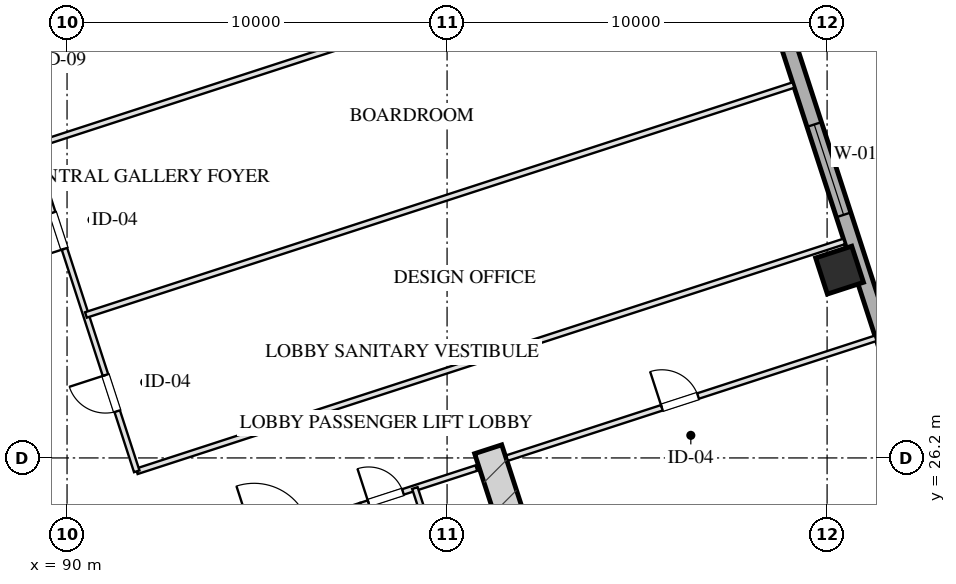
"""IFC4 building model, lengths in metres.
Left out: names, types, materials, properties, quantities, classifications, styles, units other than length and angle.
Written with IfcOpenShell. Run it as: python <this file> out.ifc"""

import sys

from ifc_helpers import new_model, si_unit, direction, frame, frame_2d, origin, origin_2d, place, context, subcontext, project, spatial, rectangle, hollow_rectangle, extrude, element, fill, save


model = new_model("IFC4")
c1 = context("Model", 3, precision=1e-05, world=origin(), true_north=direction((0.0, 1.0)))
c2 = subcontext(c1, "Body", "Model", "MODEL_VIEW")
j1 = project(units=[si_unit("LENGTHUNIT", "METRE"), si_unit("PLANEANGLEUNIT", "RADIAN")], contexts=[c1])
p1 = place(None, origin())
s1 = spatial("IfcSite", under=j1, at=p1, CompositionType="ELEMENT")
p2 = place(p1, origin())
s2 = spatial("IfcBuilding", under=s1, at=p2, CompositionType="ELEMENT")
p3 = place(p2, frame((0.0, 0.0, 34.0)))
s3 = spatial("IfcBuildingStorey", under=s2, at=p3, CompositionType="ELEMENT", Elevation=34.0)
p4 = place(p3, frame((101.082, 26.429, 0.0), z_axis=(0.0, 0.0, 1.0), x_axis=(0.309016134813, -0.951056795583, 0.0)))
e1 = element("IfcWall", 1, at=p4, inside=s3, PredefinedType="SHEAR", context=c2, shape_type="SweptSolid", body=[
    extrude(rectangle(XDim=9.63, YDim=0.75, at=frame_2d((4.815, 0.0))), origin(), (0.0, 0.0, 1.0), 4.0),
])
p5 = place(p3, frame((110.328, 31.142, 0.0), z_axis=(0.0, 0.0, 1.0), x_axis=(0.951056516295, 0.309016994375, 0.0)))
e2 = element("IfcColumn", 2, at=p5, inside=s3, PredefinedType="COLUMN", context=c2, shape_type="SweptSolid", body=[
    extrude(hollow_rectangle(XDim=1.0, YDim=1.0, WallThickness=0.036, at=origin_2d()), origin(), (0.0, 0.0, 1.0), 4.001),
])
p6 = place(p3, frame((100.345, 63.648, 0.0), z_axis=(0.0, 0.0, 1.0), x_axis=(0.309014526607, -0.951057318118, 0.0)))
e3 = element("IfcWall", 3, at=p6, inside=s3, PredefinedType="SOLIDWALL", context=c2, shape_type="SweptSolid", body=[
    extrude(rectangle(XDim=50.0, YDim=0.4, at=frame_2d((25.0, 0.0))), origin(), (0.0, 0.0, 1.0), 3.16),
])
p7 = place(p6, frame((30.15, 0.0, 0.75)))
e4 = element("IfcOpeningElement", 4, at=p7, cuts=e3, PredefinedType="OPENING", context=c2, shape_type="SweptSolid", body=[
    extrude(rectangle(XDim=2.5, YDim=1.75, at=frame_2d((1.25, 0.875))), frame((0.0, 0.21, 0.0), z_axis=(0.0, -1.0, 0.0), x_axis=(1.0, 0.0, 0.0)), (0.0, 0.0, 1.0), 0.42),
])
p8 = place(p6, frame((21.354, 0.0, 0.0)))
e5 = element("IfcOpeningElement", 5, at=p8, cuts=e3, PredefinedType="OPENING", context=c2, shape_type="SweptSolid", body=[
    extrude(rectangle(XDim=1.1, YDim=2.15, at=frame_2d((0.55, 1.075))), frame((0.0, 0.21, 0.0), z_axis=(0.0, -1.0, 0.0), x_axis=(1.0, 0.0, 0.0)), (0.0, 0.0, 1.0), 0.42),
])
p9 = place(p3, frame((97.727, 24.944, 0.0), z_axis=(0.0, 0.0, 1.0), x_axis=(0.309016001439, -0.951056838919, 0.0)))
e6 = element("IfcWall", 6, at=p9, inside=s3, PredefinedType="PARTITIONING", context=c2, shape_type="SweptSolid", body=[
    extrude(rectangle(XDim=8.43, YDim=0.2, at=frame_2d((4.215, 0.0))), origin(), (0.0, 0.0, 1.0), 3.725),
])
p10 = place(p3, frame((93.542, 23.585, 0.0), z_axis=(0.0, 0.0, 1.0), x_axis=(0.951063829732, 0.308994485023, 0.0)))
e7 = element("IfcWall", 7, at=p10, inside=s3, PredefinedType="PARTITIONING", context=c2, shape_type="SweptSolid", body=[
    extrude(rectangle(XDim=4.4, YDim=0.15, at=frame_2d((2.2, 0.0))), origin(), (0.0, 0.0, 1.0), 3.725),
])
p11 = place(p10, frame((1.45, 0.0, 0.0)))
e8 = element("IfcOpeningElement", 8, at=p11, cuts=e7, PredefinedType="OPENING", context=c2, shape_type="SweptSolid", body=[
    extrude(rectangle(XDim=1.5, YDim=2.05, at=frame_2d((0.75, 1.025))), frame((0.0, 0.085, 0.0), z_axis=(0.0, -1.0, 0.0), x_axis=(1.0, 0.0, 0.0)), (0.0, 0.0, 1.0), 0.17),
])
p12 = place(p3, frame((97.727, 24.944, 0.0), z_axis=(0.0, 0.0, 1.0), x_axis=(0.951036872128, 0.309077446369, 0.0)))
e9 = element("IfcWall", 9, at=p12, inside=s3, PredefinedType="PARTITIONING", context=c2, shape_type="SweptSolid", body=[
    extrude(rectangle(XDim=3.2, YDim=0.15, at=frame_2d((1.6, 0.0))), origin(), (0.0, 0.0, 1.0), 3.725),
])
p13 = place(p12, frame((0.22, 0.0, 0.0)))
e10 = element("IfcOpeningElement", 10, at=p13, cuts=e9, PredefinedType="OPENING", context=c2, shape_type="SweptSolid", body=[
    extrude(rectangle(XDim=0.95, YDim=2.05, at=frame_2d((0.475, 1.025))), frame((0.0, 0.085, 0.0), z_axis=(0.0, -1.0, 0.0), x_axis=(1.0, 0.0, 0.0)), (0.0, 0.0, 1.0), 0.17),
])
p14 = place(p3, frame((99.153, 25.408, 0.0), z_axis=(0.0, 0.0, 1.0), x_axis=(0.309016001439, -0.951056838919, 0.0)))
e11 = element("IfcWall", 11, at=p14, inside=s3, PredefinedType="PARTITIONING", context=c2, shape_type="SweptSolid", body=[
    extrude(rectangle(XDim=8.43, YDim=0.15, at=frame_2d((4.215, 0.0))), origin(), (0.0, 0.0, 1.0), 3.725),
])
p15 = place(p14, frame((2.55, 0.0, 0.0)))
e12 = element("IfcOpeningElement", 12, at=p15, cuts=e11, PredefinedType="OPENING", context=c2, shape_type="SweptSolid", body=[
    extrude(rectangle(XDim=0.95, YDim=2.05, at=frame_2d((0.475, 1.025))), frame((0.0, 0.085, 0.0), z_axis=(0.0, -1.0, 0.0), x_axis=(1.0, 0.0, 0.0)), (0.0, 0.0, 1.0), 0.17),
])
p16 = place(p14, frame((4.7, 0.0, 0.0)))
e13 = element("IfcOpeningElement", 13, at=p16, cuts=e11, PredefinedType="OPENING", context=c2, shape_type="SweptSolid", body=[
    extrude(rectangle(XDim=0.9, YDim=2.05, at=frame_2d((0.45, 1.025))), frame((0.0, 0.085, 0.0), z_axis=(0.0, -1.0, 0.0), x_axis=(1.0, 0.0, 0.0)), (0.0, 0.0, 1.0), 0.17),
])
p17 = place(p14, frame((6.8, 0.0, 0.0)))
e14 = element("IfcOpeningElement", 14, at=p17, cuts=e11, PredefinedType="OPENING", context=c2, shape_type="SweptSolid", body=[
    extrude(rectangle(XDim=0.9, YDim=2.05, at=frame_2d((0.45, 1.025))), frame((0.0, 0.085, 0.0), z_axis=(0.0, -1.0, 0.0), x_axis=(1.0, 0.0, 0.0)), (0.0, 0.0, 1.0), 0.17),
])
p18 = place(p3, frame((101.578, 26.196, 0.0), z_axis=(0.0, 0.0, 1.0), x_axis=(0.951059043131, 0.309009217467, 0.0)))
e15 = element("IfcWall", 15, at=p18, inside=s3, PredefinedType="PARTITIONING", context=c2, shape_type="SweptSolid", body=[
    extrude(rectangle(XDim=10.2, YDim=0.15, at=frame_2d((5.1, 0.0))), origin(), (0.0, 0.0, 1.0), 3.725),
])
p19 = place(p18, frame((4.284, 0.0, 0.0)))
e16 = element("IfcOpeningElement", 16, at=p19, cuts=e15, PredefinedType="OPENING", context=c2, shape_type="SweptSolid", body=[
    extrude(rectangle(XDim=1.0, YDim=2.05, at=frame_2d((0.5, 1.025))), frame((0.0, 0.085, 0.0), z_axis=(0.0, -1.0, 0.0), x_axis=(1.0, 0.0, 0.0)), (0.0, 0.0, 1.0), 0.17),
])
p20 = place(p3, frame((91.834, 25.848, 0.0), z_axis=(0.0, 0.0, 1.0), x_axis=(0.951055605195, 0.309019798438, 0.0)))
e17 = element("IfcWall", 17, at=p20, inside=s3, PredefinedType="PARTITIONING", context=c2, shape_type="SweptSolid", body=[
    extrude(rectangle(XDim=19.575, YDim=0.15, at=frame_2d((9.788, 0.0))), origin(), (0.0, 0.0, 1.0), 3.725),
])
p21 = place(p3, frame((91.834, 25.848, 0.0), z_axis=(0.0, 0.0, 1.0), x_axis=(-0.30901773025, 0.951056277195, 0.0)))
e18 = element("IfcWall", 18, at=p21, inside=s3, PredefinedType="PARTITIONING", context=c2, shape_type="SweptSolid", body=[
    extrude(rectangle(XDim=16.64, YDim=0.15, at=frame_2d((8.32, 0.0))), origin(), (0.0, 0.0, 1.0), 3.725),
])
p22 = place(p21, frame((1.663, 0.0, 0.0)))
e19 = element("IfcOpeningElement", 19, at=p22, cuts=e18, PredefinedType="OPENING", context=c2, shape_type="SweptSolid", body=[
    extrude(rectangle(XDim=1.0, YDim=2.05, at=frame_2d((0.5, 1.025))), frame((0.0, 0.085, 0.0), z_axis=(0.0, -1.0, 0.0), x_axis=(1.0, 0.0, 0.0)), (0.0, 0.0, 1.0), 0.17),
])
p23 = place(p21, frame((6.156, 0.0, 0.0)))
e20 = element("IfcOpeningElement", 20, at=p23, cuts=e18, PredefinedType="OPENING", context=c2, shape_type="SweptSolid", body=[
    extrude(rectangle(XDim=1.0, YDim=2.05, at=frame_2d((0.5, 1.025))), frame((0.0, 0.085, 0.0), z_axis=(0.0, -1.0, 0.0), x_axis=(1.0, 0.0, 0.0)), (0.0, 0.0, 1.0), 0.17),
])
p24 = place(p21, frame((10.649, 0.0, 0.0)))
e21 = element("IfcOpeningElement", 21, at=p24, cuts=e18, PredefinedType="OPENING", context=c2, shape_type="SweptSolid", body=[
    extrude(rectangle(XDim=0.85, YDim=2.05, at=frame_2d((0.425, 1.025))), frame((0.0, 0.085, 0.0), z_axis=(0.0, -1.0, 0.0), x_axis=(1.0, 0.0, 0.0)), (0.0, 0.0, 1.0), 0.17),
])
p25 = place(p21, frame((14.476, 0.0, 0.0)))
e22 = element("IfcOpeningElement", 22, at=p25, cuts=e18, PredefinedType="OPENING", context=c2, shape_type="SweptSolid", body=[
    extrude(rectangle(XDim=1.0, YDim=2.05, at=frame_2d((0.5, 1.025))), frame((0.0, 0.085, 0.0), z_axis=(0.0, -1.0, 0.0), x_axis=(1.0, 0.0, 0.0)), (0.0, 0.0, 1.0), 0.17),
])
for number, where, z_axis, x_axis in (
    (23, (90.497, 29.962, 0.0), (0.0, 0.0, 1.0), (0.951, 0.309, 0.0)),
    (24, (89.057, 34.394, 0.0), (0.0, 0.0, 1.0), (0.951, 0.309, 0.0)),
):
    element("IfcWall", number, at=place(p3, frame(where, z_axis=z_axis, x_axis=x_axis)), inside=s3, PredefinedType="PARTITIONING", context=c2, shape_type="SweptSolid", body=[
        extrude(rectangle(XDim=19.575, YDim=0.15, at=frame_2d((9.788, 0.0))), origin(), (0.0, 0.0, 1.0), 3.725),
    ])
p26 = place(p7, origin())
e25 = element("IfcWindow", 25, at=p26, inside=s3, PartitioningType="TRIPLE_PANEL_VERTICAL", PredefinedType="WINDOW", context=c2, shape_type="SweptSolid", body=[
    extrude(rectangle(XDim=2.5, YDim=1.75, at=frame_2d((1.25, 0.875))), frame((0.0, 0.03, 0.0), z_axis=(0.0, -1.0, 0.0), x_axis=(1.0, 0.0, 0.0)), (0.0, 0.0, 1.0), 0.06),
])
fill(e4, e25)
p27 = place(p13, origin())
e26 = element("IfcDoor", 26, at=p27, inside=s3, OperationType="SINGLE_SWING_LEFT", PredefinedType="DOOR", context=c2, shape_type="SweptSolid", body=[
    extrude(rectangle(XDim=0.95, YDim=2.05, at=frame_2d((0.475, 1.025))), frame((0.0, 0.025, 0.0), z_axis=(0.0, -1.0, 0.0), x_axis=(1.0, 0.0, 0.0)), (0.0, 0.0, 1.0), 0.05),
])
fill(e10, e26)
p28 = place(p19, origin())
e27 = element("IfcDoor", 27, at=p28, inside=s3, OperationType="SINGLE_SWING_LEFT", PredefinedType="DOOR", context=c2, shape_type="SweptSolid", body=[
    extrude(rectangle(XDim=1.0, YDim=2.05, at=frame_2d((0.5, 1.025))), frame((0.0, 0.025, 0.0), z_axis=(0.0, -1.0, 0.0), x_axis=(1.0, 0.0, 0.0)), (0.0, 0.0, 1.0), 0.05),
])
fill(e16, e27)
p29 = place(p22, origin())
e28 = element("IfcDoor", 28, at=p29, inside=s3, OperationType="SINGLE_SWING_RIGHT", PredefinedType="DOOR", context=c2, shape_type="SweptSolid", body=[
    extrude(rectangle(XDim=1.0, YDim=2.05, at=frame_2d((0.5, 1.025))), frame((0.0, 0.025, 0.0), z_axis=(0.0, -1.0, 0.0), x_axis=(1.0, 0.0, 0.0)), (0.0, 0.0, 1.0), 0.05),
])
fill(e19, e28)
p30 = place(p23, origin())
e29 = element("IfcDoor", 29, at=p30, inside=s3, OperationType="SINGLE_SWING_LEFT", PredefinedType="DOOR", context=c2, shape_type="SweptSolid", body=[
    extrude(rectangle(XDim=1.0, YDim=2.05, at=frame_2d((0.5, 1.025))), frame((0.0, 0.025, 0.0), z_axis=(0.0, -1.0, 0.0), x_axis=(1.0, 0.0, 0.0)), (0.0, 0.0, 1.0), 0.05),
])
fill(e20, e29)
save(model, sys.argv[1])
